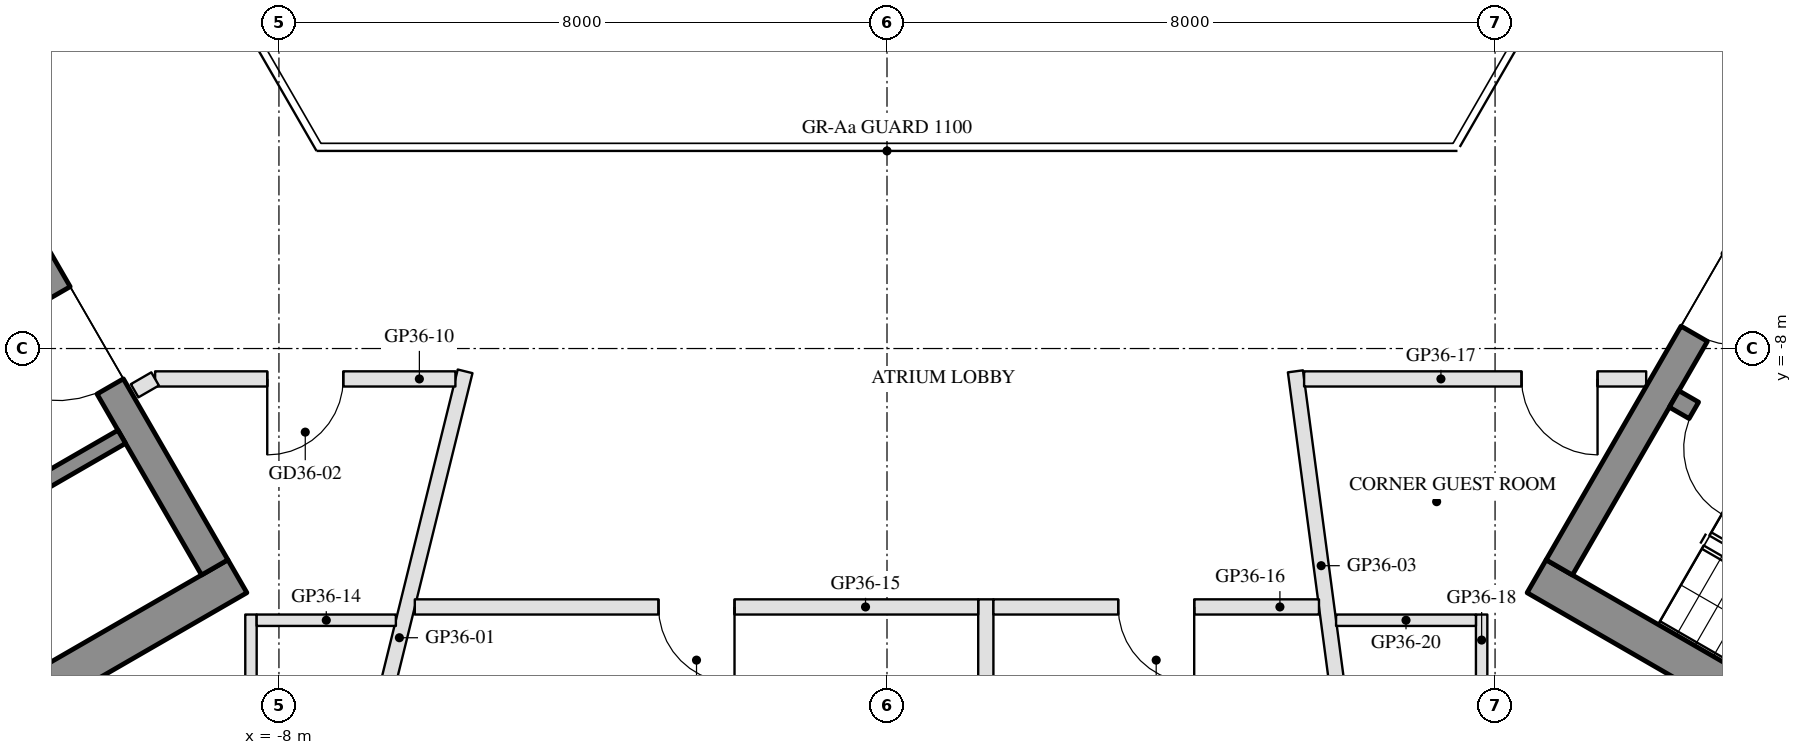
"""IFC4 building model, lengths in metres.
Left out: names, types, materials, properties, quantities, classifications, styles, units other than length and angle.
Written with IfcOpenShell. Run it as: python <this file> out.ifc"""

import sys

from ifc_helpers import new_model, si_unit, direction, frame, frame_2d, origin, place, context, subcontext, project, spatial, rectangle, extrude, element, fill, save


model = new_model("IFC4")
c1 = context("Model", 3, precision=1e-05, world=origin(), true_north=direction((0.0, 1.0)))
c2 = subcontext(c1, "Body", "Model", "MODEL_VIEW")
j1 = project(units=[si_unit("LENGTHUNIT", "METRE"), si_unit("PLANEANGLEUNIT", "RADIAN")], contexts=[c1])
p1 = place(None, origin())
s1 = spatial("IfcSite", under=j1, at=p1, CompositionType="ELEMENT")
p2 = place(p1, origin())
s2 = spatial("IfcBuilding", under=s1, at=p2, CompositionType="ELEMENT")
p3 = place(p2, frame((0.0, 0.0, 328.1)))
s3 = spatial("IfcBuildingStorey", under=s2, at=p3, CompositionType="ELEMENT", Elevation=328.1)
p4 = place(p3, frame((-8.547, -10.997, 0.0), z_axis=(0.0, 0.0, 1.0), x_axis=(-0.866031306094, -0.49998977676, 0.0)))
e1 = element("IfcWall", 1, at=p4, inside=s3, PredefinedType="SHEAR", context=c2, shape_type="SweptSolid", body=[
    extrude(rectangle(XDim=4.084, YDim=0.5, at=frame_2d((2.042, 0.0))), origin(), (0.0, 0.0, 1.0), 3.45),
])
p5 = place(p3, frame((-13.845, -2.22, 0.0), z_axis=(0.0, 0.0, 1.0), x_axis=(0.500004234368, -0.866022959057, 0.0)))
e2 = element("IfcWall", 2, at=p5, inside=s3, PredefinedType="SHEAR", context=c2, shape_type="SweptSolid", body=[
    extrude(rectangle(XDim=10.0, YDim=0.4, at=frame_2d((5.0, 0.0))), origin(), (0.0, 0.0, 1.0), 3.45),
])
p6 = place(p5, frame((3.55, 0.0, 0.0)))
e3 = element("IfcOpeningElement", 3, at=p6, cuts=e2, PredefinedType="OPENING", context=c2, shape_type="SweptSolid", body=[
    extrude(rectangle(XDim=1.1, YDim=2.1, at=frame_2d((0.55, 1.05))), frame((0.0, 0.21, 0.0), z_axis=(0.0, -1.0, 0.0), x_axis=(1.0, 0.0, 0.0)), (0.0, 0.0, 1.0), 0.42),
])
p7 = place(p5, frame((5.85, 0.0, 0.0)))
e4 = element("IfcOpeningElement", 4, at=p7, cuts=e2, PredefinedType="OPENING", context=c2, shape_type="SweptSolid", body=[
    extrude(rectangle(XDim=1.4, YDim=2.1, at=frame_2d((0.7, 1.05))), frame((0.0, 0.21, 0.0), z_axis=(0.0, -1.0, 0.0), x_axis=(1.0, 0.0, 0.0)), (0.0, 0.0, 1.0), 0.42),
])
p8 = place(p3, frame((-10.068, -9.162, 0.0), z_axis=(0.0, 0.0, 1.0), x_axis=(-0.866027741594, -0.499995950774, 0.0)))
e5 = element("IfcWall", 5, at=p8, inside=s3, PredefinedType="SHEAR", context=c2, shape_type="SweptSolid", body=[
    extrude(rectangle(XDim=9.272, YDim=0.2, at=frame_2d((4.636, 0.0))), origin(), (0.0, 0.0, 1.0), 3.45),
])
p9 = place(p8, frame((1.99, 0.0, 0.0)))
e6 = element("IfcOpeningElement", 6, at=p9, cuts=e5, PredefinedType="OPENING", context=c2, shape_type="SweptSolid", body=[
    extrude(rectangle(XDim=0.9, YDim=2.1, at=frame_2d((0.45, 1.05))), frame((0.0, 0.11, 0.0), z_axis=(0.0, -1.0, 0.0), x_axis=(1.0, 0.0, 0.0)), (0.0, 0.0, 1.0), 0.22),
])
p10 = place(p8, frame((6.709, 0.0, 0.0)))
e7 = element("IfcOpeningElement", 7, at=p10, cuts=e5, PredefinedType="OPENING", context=c2, shape_type="SweptSolid", body=[
    extrude(rectangle(XDim=0.9, YDim=2.1, at=frame_2d((0.45, 1.05))), frame((0.0, 0.11, 0.0), z_axis=(0.0, -1.0, 0.0), x_axis=(1.0, 0.0, 0.0)), (0.0, 0.0, 1.0), 0.22),
])
p11 = place(p3, frame((8.547, -10.997, 0.0), z_axis=(0.0, 0.0, 1.0), x_axis=(0.866031306094, -0.49998977676, 0.0)))
e8 = element("IfcWall", 8, at=p11, inside=s3, PredefinedType="SHEAR", context=c2, shape_type="SweptSolid", body=[
    extrude(rectangle(XDim=4.084, YDim=0.5, at=frame_2d((2.042, 0.0))), origin(), (0.0, 0.0, 1.0), 3.45),
])
p12 = place(p3, frame((8.845, -10.88, 0.0), z_axis=(0.0, 0.0, 1.0), x_axis=(0.500004234368, 0.866022959057, 0.0)))
e9 = element("IfcWall", 9, at=p12, inside=s3, PredefinedType="SHEAR", context=c2, shape_type="SweptSolid", body=[
    extrude(rectangle(XDim=10.0, YDim=0.4, at=frame_2d((5.0, 0.0))), origin(), (0.0, 0.0, 1.0), 3.45),
])
p13 = place(p12, frame((3.55, 0.0, 0.0)))
e10 = element("IfcOpeningElement", 10, at=p13, cuts=e9, PredefinedType="OPENING", context=c2, shape_type="SweptSolid", body=[
    extrude(rectangle(XDim=1.1, YDim=2.1, at=frame_2d((0.55, 1.05))), frame((0.0, 0.21, 0.0), z_axis=(0.0, -1.0, 0.0), x_axis=(1.0, 0.0, 0.0)), (0.0, 0.0, 1.0), 0.42),
])
p14 = place(p12, frame((5.85, 0.0, 0.0)))
e11 = element("IfcOpeningElement", 11, at=p14, cuts=e9, PredefinedType="OPENING", context=c2, shape_type="SweptSolid", body=[
    extrude(rectangle(XDim=1.4, YDim=2.1, at=frame_2d((0.7, 1.05))), frame((0.0, 0.21, 0.0), z_axis=(0.0, -1.0, 0.0), x_axis=(1.0, 0.0, 0.0)), (0.0, 0.0, 1.0), 0.42),
])
p15 = place(p3, frame((10.356, -8.664, 0.0), z_axis=(0.0, 0.0, 1.0), x_axis=(0.866028629588, -0.499994412703, 0.0)))
e12 = element("IfcWall", 12, at=p15, inside=s3, PredefinedType="SHEAR", context=c2, shape_type="SweptSolid", body=[
    extrude(rectangle(XDim=6.45, YDim=0.25, at=frame_2d((3.225, 0.0))), origin(), (0.0, 0.0, 1.0), 3.45),
])
p16 = place(p15, frame((0.3, 0.0, 0.0)))
e13 = element("IfcOpeningElement", 13, at=p16, cuts=e12, PredefinedType="OPENING", context=c2, shape_type="SweptSolid", body=[
    extrude(rectangle(XDim=1.0, YDim=2.1, at=frame_2d((0.5, 1.05))), frame((0.0, 0.135, 0.0), z_axis=(0.0, -1.0, 0.0), x_axis=(1.0, 0.0, 0.0)), (0.0, 0.0, 1.0), 0.27),
])
p17 = place(p3, frame((-7.28, -15.31, 0.0), z_axis=(0.0, 0.0, 1.0), x_axis=(0.239495270955, 0.970897530736, 0.0)))
e14 = element("IfcWall", 14, at=p17, inside=s3, PredefinedType="PARTITIONING", context=c2, shape_type="SweptSolid", body=[
    extrude(rectangle(XDim=7.22, YDim=0.2, at=frame_2d((3.61, 0.0))), origin(), (0.0, 0.0, 1.0), 3.05),
])
p18 = place(p3, frame((1.3, -15.31, 0.0), z_axis=(0.0, 0.0, 1.0), x_axis=(0.0, 1.0, 0.0)))
e15 = element("IfcWall", 15, at=p18, inside=s3, PredefinedType="PARTITIONING", context=c2, shape_type="SweptSolid", body=[
    extrude(rectangle(XDim=4.01, YDim=0.2, at=frame_2d((2.005, 0.0))), origin(), (0.0, 0.0, 1.0), 3.05),
])
p19 = place(p3, frame((6.051, -13.415, 0.0), z_axis=(0.0, 0.0, 1.0), x_axis=(-0.131363967537, 0.991334206024, 0.0)))
e16 = element("IfcWall", 16, at=p19, inside=s3, PredefinedType="PARTITIONING", context=c2, shape_type="SweptSolid", body=[
    extrude(rectangle(XDim=5.159, YDim=0.2, at=frame_2d((2.58, 0.0))), origin(), (0.0, 0.0, 1.0), 3.05),
])
p20 = place(p3, frame((-5.678, -8.4, 0.0), z_axis=(0.0, 0.0, 1.0), x_axis=(-1.0, 0.0, 0.0)))
e17 = element("IfcWall", 17, at=p20, inside=s3, PredefinedType="PARTITIONING", context=c2, shape_type="SweptSolid", body=[
    extrude(rectangle(XDim=3.951, YDim=0.2, at=frame_2d((1.976, 0.0))), origin(), (0.0, 0.0, 1.0), 3.05),
])
p21 = place(p20, frame((1.476, 0.0, 0.0)))
e18 = element("IfcOpeningElement", 18, at=p21, cuts=e17, PredefinedType="OPENING", context=c2, shape_type="SweptSolid", body=[
    extrude(rectangle(XDim=1.0, YDim=2.1, at=frame_2d((0.5, 1.05))), frame((0.0, 0.11, 0.0), z_axis=(0.0, -1.0, 0.0), x_axis=(1.0, 0.0, 0.0)), (0.0, 0.0, 1.0), 0.22),
])
p22 = place(p3, frame((-9.629, -8.4, 0.0), z_axis=(0.0, 0.0, 1.0), x_axis=(-0.865963302823, -0.500107546598, 0.0)))
e19 = element("IfcWall", 19, at=p22, inside=s3, PredefinedType="PARTITIONING", context=c2, shape_type="SweptSolid", body=[
    extrude(rectangle(XDim=0.311, YDim=0.2, at=frame_2d((0.156, 0.0))), origin(), (0.0, 0.0, 1.0), 3.45),
])
p23 = place(p3, frame((-8.368, -11.5, 0.0), z_axis=(0.0, 0.0, 1.0), x_axis=(0.0, -1.0, 0.0)))
e20 = element("IfcWall", 20, at=p23, inside=s3, PredefinedType="PARTITIONING", context=c2, shape_type="SweptSolid", body=[
    extrude(rectangle(XDim=2.8, YDim=0.15, at=frame_2d((1.4, 0.0))), origin(), (0.0, 0.0, 1.0), 3.05),
])
p24 = place(p23, frame((1.4, 0.0, 0.0)))
e21 = element("IfcOpeningElement", 21, at=p24, cuts=e20, PredefinedType="OPENING", context=c2, shape_type="SweptSolid", body=[
    extrude(rectangle(XDim=0.9, YDim=2.1, at=frame_2d((0.45, 1.05))), frame((0.0, 0.085, 0.0), z_axis=(0.0, -1.0, 0.0), x_axis=(1.0, 0.0, 0.0)), (0.0, 0.0, 1.0), 0.17),
])
p25 = place(p3, frame((-8.293, -11.575, 0.0), z_axis=(0.0, 0.0, 1.0), x_axis=(1.0, 0.0, 0.0)))
e22 = element("IfcWall", 22, at=p25, inside=s3, PredefinedType="PARTITIONING", context=c2, shape_type="SweptSolid", body=[
    extrude(rectangle(XDim=1.832, YDim=0.15, at=frame_2d((0.916, 0.0))), origin(), (0.0, 0.0, 1.0), 3.45),
])
p26 = place(p3, frame((1.2, -11.4, 0.0), z_axis=(0.0, 0.0, 1.0), x_axis=(-1.0, 0.0, 0.0)))
e23 = element("IfcWall", 23, at=p26, inside=s3, PredefinedType="PARTITIONING", context=c2, shape_type="SweptSolid", body=[
    extrude(rectangle(XDim=7.412, YDim=0.2, at=frame_2d((3.706, 0.0))), origin(), (0.0, 0.0, 1.0), 3.05),
])
p27 = place(p26, frame((3.206, 0.0, 0.0)))
e24 = element("IfcOpeningElement", 24, at=p27, cuts=e23, PredefinedType="OPENING", context=c2, shape_type="SweptSolid", body=[
    extrude(rectangle(XDim=1.0, YDim=2.1, at=frame_2d((0.5, 1.05))), frame((0.0, 0.11, 0.0), z_axis=(0.0, -1.0, 0.0), x_axis=(1.0, 0.0, 0.0)), (0.0, 0.0, 1.0), 0.22),
])
p28 = place(p3, frame((5.683, -11.4, 0.0), z_axis=(0.0, 0.0, 1.0), x_axis=(-1.0, 0.0, 0.0)))
e25 = element("IfcWall", 25, at=p28, inside=s3, PredefinedType="PARTITIONING", context=c2, shape_type="SweptSolid", body=[
    extrude(rectangle(XDim=4.283, YDim=0.2, at=frame_2d((2.142, 0.0))), origin(), (0.0, 0.0, 1.0), 3.05),
])
p29 = place(p28, frame((1.642, 0.0, 0.0)))
e26 = element("IfcOpeningElement", 26, at=p29, cuts=e25, PredefinedType="OPENING", context=c2, shape_type="SweptSolid", body=[
    extrude(rectangle(XDim=1.0, YDim=2.1, at=frame_2d((0.5, 1.05))), frame((0.0, 0.11, 0.0), z_axis=(0.0, -1.0, 0.0), x_axis=(1.0, 0.0, 0.0)), (0.0, 0.0, 1.0), 0.22),
])
p30 = place(p3, frame((9.988, -8.4, 0.0), z_axis=(0.0, 0.0, 1.0), x_axis=(-1.0, 0.0, 0.0)))
e27 = element("IfcWall", 27, at=p30, inside=s3, PredefinedType="PARTITIONING", context=c2, shape_type="SweptSolid", body=[
    extrude(rectangle(XDim=4.501, YDim=0.2, at=frame_2d((2.25, 0.0))), origin(), (0.0, 0.0, 1.0), 3.05),
])
p31 = place(p30, frame((0.64, 0.0, 0.0)))
e28 = element("IfcOpeningElement", 28, at=p31, cuts=e27, PredefinedType="OPENING", context=c2, shape_type="SweptSolid", body=[
    extrude(rectangle(XDim=1.0, YDim=2.1, at=frame_2d((0.5, 1.05))), frame((0.0, 0.11, 0.0), z_axis=(0.0, -1.0, 0.0), x_axis=(1.0, 0.0, 0.0)), (0.0, 0.0, 1.0), 0.22),
])
p32 = place(p3, frame((7.823, -14.3, 0.0), z_axis=(0.0, 0.0, 1.0), x_axis=(0.0, 1.0, 0.0)))
e29 = element("IfcWall", 29, at=p32, inside=s3, PredefinedType="PARTITIONING", context=c2, shape_type="SweptSolid", body=[
    extrude(rectangle(XDim=2.8, YDim=0.15, at=frame_2d((1.4, 0.0))), origin(), (0.0, 0.0, 1.0), 3.05),
])
p33 = place(p32, frame((0.5, 0.0, 0.0)))
e30 = element("IfcOpeningElement", 30, at=p33, cuts=e29, PredefinedType="OPENING", context=c2, shape_type="SweptSolid", body=[
    extrude(rectangle(XDim=0.9, YDim=2.1, at=frame_2d((0.45, 1.05))), frame((0.0, 0.085, 0.0), z_axis=(0.0, -1.0, 0.0), x_axis=(1.0, 0.0, 0.0)), (0.0, 0.0, 1.0), 0.17),
])
p34 = place(p3, frame((5.908, -11.575, 0.0), z_axis=(0.0, 0.0, 1.0), x_axis=(1.0, 0.0, 0.0)))
e31 = element("IfcWall", 31, at=p34, inside=s3, PredefinedType="PARTITIONING", context=c2, shape_type="SweptSolid", body=[
    extrude(rectangle(XDim=1.84, YDim=0.15, at=frame_2d((0.92, 0.0))), origin(), (0.0, 0.0, 1.0), 3.05),
])
p35 = place(p3, frame((-12.038, -4.85, 0.0), z_axis=(0.0, 0.0, 1.0), x_axis=(0.500001049025, 0.866024798128, 0.0)))
e32 = element("IfcWall", 32, at=p35, inside=s3, PredefinedType="PARTITIONING", context=c2, shape_type="SweptSolid", body=[
    extrude(rectangle(XDim=6.119, YDim=0.2, at=frame_2d((3.06, 0.0))), origin(), (0.0, 0.0, 1.0), 3.05),
])
p36 = place(p35, frame((2.669, 0.0, 0.0)))
e33 = element("IfcOpeningElement", 33, at=p36, cuts=e32, PredefinedType="OPENING", context=c2, shape_type="SweptSolid", body=[
    extrude(rectangle(XDim=1.0, YDim=2.1, at=frame_2d((0.5, 1.05))), frame((0.0, 0.11, 0.0), z_axis=(0.0, -1.0, 0.0), x_axis=(1.0, 0.0, 0.0)), (0.0, 0.0, 1.0), 0.22),
])
p37 = place(p7, frame((1.4, 0.0, 0.0), z_axis=(0.0, 0.0, 1.0), x_axis=(-1.0, 0.0, 0.0)))
e34 = element("IfcDoor", 34, at=p37, inside=s3, OperationType="DOUBLE_DOOR_SINGLE_SWING", PredefinedType="DOOR", context=c2, shape_type="SweptSolid", body=[
    extrude(rectangle(XDim=1.4, YDim=2.1, at=frame_2d((0.7, 1.05))), frame((0.0, 0.025, 0.0), z_axis=(0.0, -1.0, 0.0), x_axis=(1.0, 0.0, 0.0)), (0.0, 0.0, 1.0), 0.05),
])
fill(e4, e34)
p38 = place(p13, frame((1.1, 0.0, 0.0), z_axis=(0.0, 0.0, 1.0), x_axis=(-1.0, 0.0, 0.0)))
e35 = element("IfcDoor", 35, at=p38, inside=s3, OperationType="SINGLE_SWING_LEFT", PredefinedType="DOOR", context=c2, shape_type="SweptSolid", body=[
    extrude(rectangle(XDim=1.1, YDim=2.1, at=frame_2d((0.55, 1.05))), frame((0.0, 0.025, 0.0), z_axis=(0.0, -1.0, 0.0), x_axis=(1.0, 0.0, 0.0)), (0.0, 0.0, 1.0), 0.05),
])
fill(e10, e35)
p39 = place(p16, frame((1.0, 0.0, 0.0), z_axis=(0.0, 0.0, 1.0), x_axis=(-1.0, 0.0, 0.0)))
e36 = element("IfcDoor", 36, at=p39, inside=s3, OperationType="SINGLE_SWING_LEFT", PredefinedType="DOOR", context=c2, shape_type="SweptSolid", body=[
    extrude(rectangle(XDim=1.0, YDim=2.1, at=frame_2d((0.5, 1.05))), frame((0.0, 0.025, 0.0), z_axis=(0.0, -1.0, 0.0), x_axis=(1.0, 0.0, 0.0)), (0.0, 0.0, 1.0), 0.05),
])
fill(e13, e36)
p40 = place(p21, origin())
e37 = element("IfcDoor", 37, at=p40, inside=s3, OperationType="SINGLE_SWING_RIGHT", PredefinedType="DOOR", context=c2, shape_type="SweptSolid", body=[
    extrude(rectangle(XDim=1.0, YDim=2.1, at=frame_2d((0.5, 1.05))), frame((0.0, 0.025, 0.0), z_axis=(0.0, -1.0, 0.0), x_axis=(1.0, 0.0, 0.0)), (0.0, 0.0, 1.0), 0.05),
])
fill(e18, e37)
p41 = place(p27, origin())
e38 = element("IfcDoor", 38, at=p41, inside=s3, OperationType="SINGLE_SWING_LEFT", PredefinedType="DOOR", context=c2, shape_type="SweptSolid", body=[
    extrude(rectangle(XDim=1.0, YDim=2.1, at=frame_2d((0.5, 1.05))), frame((0.0, 0.025, 0.0), z_axis=(0.0, -1.0, 0.0), x_axis=(1.0, 0.0, 0.0)), (0.0, 0.0, 1.0), 0.05),
])
fill(e24, e38)
p42 = place(p29, origin())
e39 = element("IfcDoor", 39, at=p42, inside=s3, OperationType="SINGLE_SWING_LEFT", PredefinedType="DOOR", context=c2, shape_type="SweptSolid", body=[
    extrude(rectangle(XDim=1.0, YDim=2.1, at=frame_2d((0.5, 1.05))), frame((0.0, 0.025, 0.0), z_axis=(0.0, -1.0, 0.0), x_axis=(1.0, 0.0, 0.0)), (0.0, 0.0, 1.0), 0.05),
])
fill(e26, e39)
p43 = place(p31, origin())
e40 = element("IfcDoor", 40, at=p43, inside=s3, OperationType="SINGLE_SWING_LEFT", PredefinedType="DOOR", context=c2, shape_type="SweptSolid", body=[
    extrude(rectangle(XDim=1.0, YDim=2.1, at=frame_2d((0.5, 1.05))), frame((0.0, 0.025, 0.0), z_axis=(0.0, -1.0, 0.0), x_axis=(1.0, 0.0, 0.0)), (0.0, 0.0, 1.0), 0.05),
])
fill(e28, e40)
save(model, sys.argv[1])
